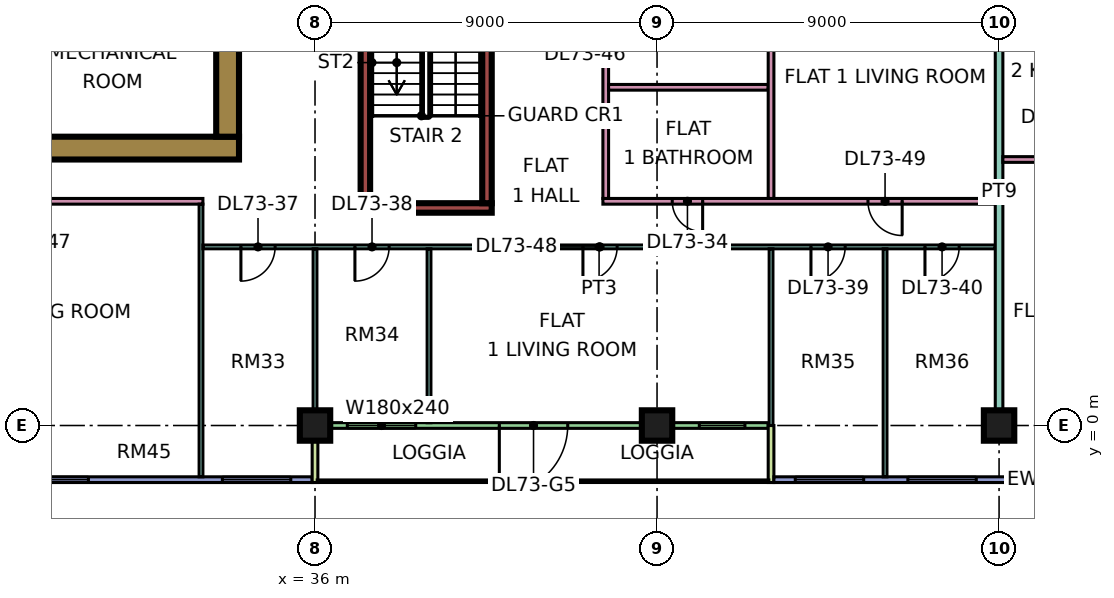
"""IFC4 building model, lengths in metres.
Left out: names, types, materials, properties, quantities, classifications, styles, units other than length and angle.
Written with IfcOpenShell. Run it as: python <this file> out.ifc"""

import sys

from ifc_helpers import new_model, si_unit, direction, frame, frame_2d, origin, origin_2d, place, context, subcontext, project, spatial, rectangle, extrude, element, fill, save


model = new_model("IFC4")
c1 = context("Model", 3, precision=1e-05, world=origin(), true_north=direction((0.0, 1.0)))
c2 = subcontext(c1, "Body", "Model", "MODEL_VIEW")
j1 = project(units=[si_unit("LENGTHUNIT", "METRE"), si_unit("PLANEANGLEUNIT", "RADIAN")], contexts=[c1])
p1 = place(None, origin())
s1 = spatial("IfcSite", under=j1, at=p1, CompositionType="ELEMENT")
p2 = place(p1, origin())
s2 = spatial("IfcBuilding", under=s1, at=p2, CompositionType="ELEMENT")
p3 = place(p2, frame((0.0, 0.0, 310.9)))
s3 = spatial("IfcBuildingStorey", under=s2, at=p3, CompositionType="ELEMENT", Elevation=310.9)
for number, where, z_axis, x_axis in (
    (1, (36.0, 0.0, 0.0), (0.0, 0.0, 1.0), (1.0, 0.0, 0.0)),
    (2, (45.0, 0.0, 0.0), (0.0, 0.0, 1.0), (1.0, 0.0, 0.0)),
    (3, (54.0, 0.0, 0.0), (0.0, 0.0, 1.0), (1.0, 0.0, 0.0)),
):
    element("IfcColumn", number, at=place(p3, frame(where, z_axis=z_axis, x_axis=x_axis)), inside=s3, PredefinedType="COLUMN", context=c2, shape_type="SweptSolid", body=[
        extrude(rectangle(XDim=0.8, YDim=0.8, at=origin_2d()), origin(), (0.0, 0.0, 1.0), 3.75),
    ])
p4 = place(p3, frame((9.0, 7.3, 0.0), z_axis=(0.0, 0.0, 1.0), x_axis=(1.0, 0.0, 0.0)))
e4 = element("IfcWall", 4, at=p4, inside=s3, PredefinedType="SHEAR", context=c2, shape_type="SweptSolid", body=[
    extrude(rectangle(XDim=25.0, YDim=0.6, at=frame_2d((12.5, 0.0))), origin(), (0.0, 0.0, 1.0), 3.75),
])
p5 = place(p3, frame((33.7, 7.6, 0.0), z_axis=(0.0, 0.0, 1.0), x_axis=(0.0, 1.0, 0.0)))
e5 = element("IfcWall", 5, at=p5, inside=s3, PredefinedType="SHEAR", context=c2, shape_type="SweptSolid", body=[
    extrude(rectangle(XDim=11.8, YDim=0.6, at=frame_2d((5.9, 0.0))), origin(), (0.0, 0.0, 1.0), 3.75),
])
p6 = place(p5, frame((5.6, 0.0, 0.0)))
e6 = element("IfcOpeningElement", 6, at=p6, cuts=e5, PredefinedType="OPENING", context=c2, shape_type="SweptSolid", body=[
    extrude(rectangle(XDim=1.8, YDim=2.4, at=frame_2d((0.9, 1.2))), frame((0.0, 0.31, 0.0), z_axis=(0.0, -1.0, 0.0), x_axis=(1.0, 0.0, 0.0)), (0.0, 0.0, 1.0), 0.62),
])
p7 = place(p3, frame((37.2, 5.725, 0.0), z_axis=(0.0, 0.0, 1.0), x_axis=(1.0, 0.0, 0.0)))
e7 = element("IfcWall", 7, at=p7, inside=s3, PredefinedType="SHEAR", context=c2, shape_type="SweptSolid", body=[
    extrude(rectangle(XDim=3.45, YDim=0.25, at=frame_2d((1.725, 0.0))), origin(), (0.0, 0.0, 1.0), 3.75),
])
for number, where, z_axis, x_axis in (
    (8, (37.325, 5.85, 0.0), (0.0, 0.0, 1.0), (0.0, 1.0, 0.0)),
    (9, (40.525, 5.85, 0.0), (0.0, 0.0, 1.0), (0.0, 1.0, 0.0)),
):
    element("IfcWall", number, at=place(p3, frame(where, z_axis=z_axis, x_axis=x_axis)), inside=s3, PredefinedType="SHEAR", context=c2, shape_type="SweptSolid", body=[
        extrude(rectangle(XDim=6.5, YDim=0.25, at=frame_2d((3.25, 0.0))), origin(), (0.0, 0.0, 1.0), 3.75),
    ])
p8 = place(p3, frame((24.075, -1.425, 0.0), z_axis=(0.0, 0.0, 1.0), x_axis=(1.0, 0.0, 0.0)))
e10 = element("IfcWall", 10, at=p8, inside=s3, PredefinedType="SOLIDWALL", context=c2, shape_type="SweptSolid", body=[
    extrude(rectangle(XDim=11.85, YDim=0.15, at=frame_2d((5.925, 0.0))), origin(), (0.0, 0.0, 1.0), 3.35),
])
p9 = place(p8, frame((2.962, 0.0, 0.45)))
e11 = element("IfcOpeningElement", 11, at=p9, cuts=e10, PredefinedType="OPENING", context=c2, shape_type="SweptSolid", body=[
    extrude(rectangle(XDim=3.0, YDim=2.4, at=frame_2d((1.5, 1.2))), frame((0.0, 0.085, 0.0), z_axis=(0.0, -1.0, 0.0), x_axis=(1.0, 0.0, 0.0)), (0.0, 0.0, 1.0), 0.17),
])
p10 = place(p8, frame((9.488, 0.0, 0.45)))
e12 = element("IfcOpeningElement", 12, at=p10, cuts=e10, PredefinedType="OPENING", context=c2, shape_type="SweptSolid", body=[
    extrude(rectangle(XDim=1.8, YDim=2.4, at=frame_2d((0.9, 1.2))), frame((0.0, 0.085, 0.0), z_axis=(0.0, -1.0, 0.0), x_axis=(1.0, 0.0, 0.0)), (0.0, 0.0, 1.0), 0.17),
])
p11 = place(p3, frame((36.075, 0.0, 0.0), z_axis=(0.0, 0.0, 1.0), x_axis=(1.0, 0.0, 0.0)))
e13 = element("IfcWall", 13, at=p11, inside=s3, PredefinedType="SOLIDWALL", context=c2, shape_type="SweptSolid", body=[
    extrude(rectangle(XDim=11.85, YDim=0.15, at=frame_2d((5.925, 0.0))), origin(), (0.0, 0.0, 1.0), 3.35),
])
p12 = place(p11, frame((0.775, 0.0, 0.45)))
e14 = element("IfcOpeningElement", 14, at=p12, cuts=e13, PredefinedType="OPENING", context=c2, shape_type="SweptSolid", body=[
    extrude(rectangle(XDim=1.8, YDim=2.4, at=frame_2d((0.9, 1.2))), frame((0.0, 0.085, 0.0), z_axis=(0.0, -1.0, 0.0), x_axis=(1.0, 0.0, 0.0)), (0.0, 0.0, 1.0), 0.17),
])
p13 = place(p11, frame((4.775, 0.0, 0.0)))
e15 = element("IfcOpeningElement", 15, at=p13, cuts=e13, PredefinedType="OPENING", context=c2, shape_type="SweptSolid", body=[
    extrude(rectangle(XDim=1.8, YDim=2.4, at=frame_2d((0.9, 1.2))), frame((0.0, 0.085, 0.0), z_axis=(0.0, -1.0, 0.0), x_axis=(1.0, 0.0, 0.0)), (0.0, 0.0, 1.0), 0.17),
])
p14 = place(p11, frame((10.038, 0.0, 0.45)))
e16 = element("IfcOpeningElement", 16, at=p14, cuts=e13, PredefinedType="OPENING", context=c2, shape_type="SweptSolid", body=[
    extrude(rectangle(XDim=1.2, YDim=2.4, at=frame_2d((0.6, 1.2))), frame((0.0, 0.085, 0.0), z_axis=(0.0, -1.0, 0.0), x_axis=(1.0, 0.0, 0.0)), (0.0, 0.0, 1.0), 0.17),
])
for number, where, z_axis, x_axis in (
    (17, (36.0, -1.5, 0.0), (0.0, 0.0, 1.0), (0.0, 1.0, 0.0)),
    (18, (48.0, -1.5, 0.0), (0.0, 0.0, 1.0), (0.0, 1.0, 0.0)),
):
    element("IfcWall", number, at=place(p3, frame(where, z_axis=z_axis, x_axis=x_axis)), inside=s3, PredefinedType="SOLIDWALL", context=c2, shape_type="SweptSolid", body=[
        extrude(rectangle(XDim=1.5, YDim=0.15, at=frame_2d((0.75, 0.0))), origin(), (0.0, 0.0, 1.0), 3.35),
    ])
p15 = place(p3, frame((48.075, -1.425, 0.0), z_axis=(0.0, 0.0, 1.0), x_axis=(1.0, 0.0, 0.0)))
e19 = element("IfcWall", 19, at=p15, inside=s3, PredefinedType="SOLIDWALL", context=c2, shape_type="SweptSolid", body=[
    extrude(rectangle(XDim=13.425, YDim=0.15, at=frame_2d((6.712, 0.0))), origin(), (0.0, 0.0, 1.0), 3.35),
])
p16 = place(p15, frame((0.562, 0.0, 0.45)))
e20 = element("IfcOpeningElement", 20, at=p16, cuts=e19, PredefinedType="OPENING", context=c2, shape_type="SweptSolid", body=[
    extrude(rectangle(XDim=1.8, YDim=2.4, at=frame_2d((0.9, 1.2))), frame((0.0, 0.085, 0.0), z_axis=(0.0, -1.0, 0.0), x_axis=(1.0, 0.0, 0.0)), (0.0, 0.0, 1.0), 0.17),
])
p17 = place(p15, frame((3.525, 0.0, 0.45)))
e21 = element("IfcOpeningElement", 21, at=p17, cuts=e19, PredefinedType="OPENING", context=c2, shape_type="SweptSolid", body=[
    extrude(rectangle(XDim=1.8, YDim=2.4, at=frame_2d((0.9, 1.2))), frame((0.0, 0.085, 0.0), z_axis=(0.0, -1.0, 0.0), x_axis=(1.0, 0.0, 0.0)), (0.0, 0.0, 1.0), 0.17),
])
p18 = place(p15, frame((7.425, 0.0, 0.45)))
e22 = element("IfcOpeningElement", 22, at=p18, cuts=e19, PredefinedType="OPENING", context=c2, shape_type="SweptSolid", body=[
    extrude(rectangle(XDim=3.0, YDim=2.4, at=frame_2d((1.5, 1.2))), frame((0.0, 0.085, 0.0), z_axis=(0.0, -1.0, 0.0), x_axis=(1.0, 0.0, 0.0)), (0.0, 0.0, 1.0), 0.17),
])
p19 = place(p15, frame((12.225, 0.0, 0.45)))
e23 = element("IfcOpeningElement", 23, at=p19, cuts=e19, PredefinedType="OPENING", context=c2, shape_type="SweptSolid", body=[
    extrude(rectangle(XDim=0.9, YDim=2.4, at=frame_2d((0.45, 1.2))), frame((0.0, 0.085, 0.0), z_axis=(0.0, -1.0, 0.0), x_axis=(1.0, 0.0, 0.0)), (0.0, 0.0, 1.0), 0.17),
])
p20 = place(p3, frame((11.95, 5.9, 0.0), z_axis=(0.0, 0.0, 1.0), x_axis=(1.0, 0.0, 0.0)))
e24 = element("IfcWall", 24, at=p20, inside=s3, PredefinedType="PARTITIONING", context=c2, shape_type="SweptSolid", body=[
    extrude(rectangle(XDim=21.1, YDim=0.15, at=frame_2d((10.55, 0.0))), origin(), (0.0, 0.0, 1.0), 3.35),
])
p21 = place(p20, frame((1.1, 0.0, 0.0)))
e25 = element("IfcOpeningElement", 25, at=p21, cuts=e24, PredefinedType="OPENING", context=c2, shape_type="SweptSolid", body=[
    extrude(rectangle(XDim=0.9, YDim=2.1, at=frame_2d((0.45, 1.05))), frame((0.0, 0.085, 0.0), z_axis=(0.0, -1.0, 0.0), x_axis=(1.0, 0.0, 0.0)), (0.0, 0.0, 1.0), 0.17),
])
p22 = place(p20, frame((4.1, 0.0, 0.0)))
e26 = element("IfcOpeningElement", 26, at=p22, cuts=e24, PredefinedType="OPENING", context=c2, shape_type="SweptSolid", body=[
    extrude(rectangle(XDim=0.9, YDim=2.1, at=frame_2d((0.45, 1.05))), frame((0.0, 0.085, 0.0), z_axis=(0.0, -1.0, 0.0), x_axis=(1.0, 0.0, 0.0)), (0.0, 0.0, 1.0), 0.17),
])
p23 = place(p20, frame((10.1, 0.0, 0.0)))
e27 = element("IfcOpeningElement", 27, at=p23, cuts=e24, PredefinedType="OPENING", context=c2, shape_type="SweptSolid", body=[
    extrude(rectangle(XDim=0.9, YDim=2.1, at=frame_2d((0.45, 1.05))), frame((0.0, 0.085, 0.0), z_axis=(0.0, -1.0, 0.0), x_axis=(1.0, 0.0, 0.0)), (0.0, 0.0, 1.0), 0.17),
])
p24 = place(p20, frame((16.1, 0.0, 0.0)))
e28 = element("IfcOpeningElement", 28, at=p24, cuts=e24, PredefinedType="OPENING", context=c2, shape_type="SweptSolid", body=[
    extrude(rectangle(XDim=0.9, YDim=2.1, at=frame_2d((0.45, 1.05))), frame((0.0, 0.085, 0.0), z_axis=(0.0, -1.0, 0.0), x_axis=(1.0, 0.0, 0.0)), (0.0, 0.0, 1.0), 0.17),
])
p25 = place(p3, frame((33.0, -1.35, 0.0), z_axis=(0.0, 0.0, 1.0), x_axis=(0.0, 1.0, 0.0)))
e29 = element("IfcWall", 29, at=p25, inside=s3, PredefinedType="PARTITIONING", context=c2, shape_type="SweptSolid", body=[
    extrude(rectangle(XDim=7.175, YDim=0.1, at=frame_2d((3.587, 0.0))), origin(), (0.0, 0.0, 1.0), 3.35),
])
p26 = place(p3, frame((33.05, 4.7, 0.0), z_axis=(0.0, 0.0, 1.0), x_axis=(1.0, 0.0, 0.0)))
e30 = element("IfcWall", 30, at=p26, inside=s3, PredefinedType="PARTITIONING", context=c2, shape_type="SweptSolid", body=[
    extrude(rectangle(XDim=20.85, YDim=0.1, at=frame_2d((10.425, 0.0))), origin(), (0.0, 0.0, 1.0), 3.35),
])
p27 = place(p26, frame((1.0, 0.0, 0.0)))
e31 = element("IfcOpeningElement", 31, at=p27, cuts=e30, PredefinedType="OPENING", context=c2, shape_type="SweptSolid", body=[
    extrude(rectangle(XDim=0.9, YDim=2.1, at=frame_2d((0.45, 1.05))), frame((0.0, 0.06, 0.0), z_axis=(0.0, -1.0, 0.0), x_axis=(1.0, 0.0, 0.0)), (0.0, 0.0, 1.0), 0.12),
])
p28 = place(p26, frame((4.0, 0.0, 0.0)))
e32 = element("IfcOpeningElement", 32, at=p28, cuts=e30, PredefinedType="OPENING", context=c2, shape_type="SweptSolid", body=[
    extrude(rectangle(XDim=0.9, YDim=2.1, at=frame_2d((0.45, 1.05))), frame((0.0, 0.06, 0.0), z_axis=(0.0, -1.0, 0.0), x_axis=(1.0, 0.0, 0.0)), (0.0, 0.0, 1.0), 0.12),
])
p29 = place(p26, frame((16.0, 0.0, 0.0)))
e33 = element("IfcOpeningElement", 33, at=p29, cuts=e30, PredefinedType="OPENING", context=c2, shape_type="SweptSolid", body=[
    extrude(rectangle(XDim=0.9, YDim=2.1, at=frame_2d((0.45, 1.05))), frame((0.0, 0.06, 0.0), z_axis=(0.0, -1.0, 0.0), x_axis=(1.0, 0.0, 0.0)), (0.0, 0.0, 1.0), 0.12),
])
p30 = place(p26, frame((19.0, 0.0, 0.0)))
e34 = element("IfcOpeningElement", 34, at=p30, cuts=e30, PredefinedType="OPENING", context=c2, shape_type="SweptSolid", body=[
    extrude(rectangle(XDim=0.9, YDim=2.1, at=frame_2d((0.45, 1.05))), frame((0.0, 0.06, 0.0), z_axis=(0.0, -1.0, 0.0), x_axis=(1.0, 0.0, 0.0)), (0.0, 0.0, 1.0), 0.12),
])
p31 = place(p26, frame((10.0, 0.0, 0.0)))
e35 = element("IfcOpeningElement", 35, at=p31, cuts=e30, PredefinedType="OPENING", context=c2, shape_type="SweptSolid", body=[
    extrude(rectangle(XDim=0.9, YDim=2.1, at=frame_2d((0.45, 1.05))), frame((0.0, 0.06, 0.0), z_axis=(0.0, -1.0, 0.0), x_axis=(1.0, 0.0, 0.0)), (0.0, 0.0, 1.0), 0.12),
])
p32 = place(p3, frame((36.0, 0.0, 0.0), z_axis=(0.0, 0.0, 1.0), x_axis=(0.0, 1.0, 0.0)))
e36 = element("IfcWall", 36, at=p32, inside=s3, PredefinedType="PARTITIONING", context=c2, shape_type="SweptSolid", body=[
    extrude(rectangle(XDim=4.65, YDim=0.1, at=frame_2d((2.325, 0.0))), origin(), (0.0, 0.0, 1.0), 3.35),
])
p33 = place(p3, frame((39.0, 0.074, 0.0), z_axis=(0.0, 0.0, 1.0), x_axis=(0.0, 1.0, 0.0)))
e37 = element("IfcWall", 37, at=p33, inside=s3, PredefinedType="PARTITIONING", context=c2, shape_type="SweptSolid", body=[
    extrude(rectangle(XDim=4.576, YDim=0.1, at=frame_2d((2.288, 0.0))), origin(), (0.0, 0.0, 1.0), 3.35),
])
p34 = place(p3, frame((43.575, 5.9, 0.0), z_axis=(0.0, 0.0, 1.0), x_axis=(1.0, 0.0, 0.0)))
e38 = element("IfcWall", 38, at=p34, inside=s3, PredefinedType="PARTITIONING", context=c2, shape_type="SweptSolid", body=[
    extrude(rectangle(XDim=10.325, YDim=0.15, at=frame_2d((5.163, 0.0))), origin(), (0.0, 0.0, 1.0), 3.35),
])
p35 = place(p34, frame((1.825, 0.0, 0.0)))
e39 = element("IfcOpeningElement", 39, at=p35, cuts=e38, PredefinedType="OPENING", context=c2, shape_type="SweptSolid", body=[
    extrude(rectangle(XDim=0.8, YDim=2.1, at=frame_2d((0.4, 1.05))), frame((0.0, 0.085, 0.0), z_axis=(0.0, -1.0, 0.0), x_axis=(1.0, 0.0, 0.0)), (0.0, 0.0, 1.0), 0.17),
])
p36 = place(p34, frame((6.975, 0.0, 0.0)))
e40 = element("IfcOpeningElement", 40, at=p36, cuts=e38, PredefinedType="OPENING", context=c2, shape_type="SweptSolid", body=[
    extrude(rectangle(XDim=0.9, YDim=2.1, at=frame_2d((0.45, 1.05))), frame((0.0, 0.085, 0.0), z_axis=(0.0, -1.0, 0.0), x_axis=(1.0, 0.0, 0.0)), (0.0, 0.0, 1.0), 0.17),
])
p37 = place(p3, frame((43.65, 5.975, 0.0), z_axis=(0.0, 0.0, 1.0), x_axis=(0.0, 1.0, 0.0)))
e41 = element("IfcWall", 41, at=p37, inside=s3, PredefinedType="PARTITIONING", context=c2, shape_type="SweptSolid", body=[
    extrude(rectangle(XDim=6.325, YDim=0.15, at=frame_2d((3.163, 0.0))), origin(), (0.0, 0.0, 1.0), 3.35),
])
p38 = place(p37, frame((4.275, 0.0, 0.0)))
e42 = element("IfcOpeningElement", 42, at=p38, cuts=e41, PredefinedType="OPENING", context=c2, shape_type="SweptSolid", body=[
    extrude(rectangle(XDim=0.9, YDim=2.1, at=frame_2d((0.45, 1.05))), frame((0.0, 0.085, 0.0), z_axis=(0.0, -1.0, 0.0), x_axis=(1.0, 0.0, 0.0)), (0.0, 0.0, 1.0), 0.17),
])
p39 = place(p3, frame((43.725, 8.9, 0.0), z_axis=(0.0, 0.0, 1.0), x_axis=(1.0, 0.0, 0.0)))
e43 = element("IfcWall", 43, at=p39, inside=s3, PredefinedType="PARTITIONING", context=c2, shape_type="SweptSolid", body=[
    extrude(rectangle(XDim=4.2, YDim=0.15, at=frame_2d((2.1, 0.0))), origin(), (0.0, 0.0, 1.0), 3.35),
])
p40 = place(p3, frame((48.0, 0.0, 0.0), z_axis=(0.0, 0.0, 1.0), x_axis=(0.0, 1.0, 0.0)))
e44 = element("IfcWall", 44, at=p40, inside=s3, PredefinedType="PARTITIONING", context=c2, shape_type="SweptSolid", body=[
    extrude(rectangle(XDim=4.65, YDim=0.1, at=frame_2d((2.325, 0.0))), origin(), (0.0, 0.0, 1.0), 3.35),
])
p41 = place(p3, frame((48.0, 5.975, 0.0), z_axis=(0.0, 0.0, 1.0), x_axis=(0.0, 1.0, 0.0)))
e45 = element("IfcWall", 45, at=p41, inside=s3, PredefinedType="PARTITIONING", context=c2, shape_type="SweptSolid", body=[
    extrude(rectangle(XDim=6.325, YDim=0.15, at=frame_2d((3.163, 0.0))), origin(), (0.0, 0.0, 1.0), 3.35),
])
p42 = place(p3, frame((51.0, -1.351, 0.0), z_axis=(0.0, 0.0, 1.0), x_axis=(0.0, 1.0, 0.0)))
e46 = element("IfcWall", 46, at=p42, inside=s3, PredefinedType="PARTITIONING", context=c2, shape_type="SweptSolid", body=[
    extrude(rectangle(XDim=6.001, YDim=0.1, at=frame_2d((3.0, 0.0))), origin(), (0.0, 0.0, 1.0), 3.35),
])
p43 = place(p3, frame((54.0, 0.0, 0.0), z_axis=(0.0, 0.0, 1.0), x_axis=(0.0, 1.0, 0.0)))
e47 = element("IfcWall", 47, at=p43, inside=s3, PredefinedType="PARTITIONING", context=c2, shape_type="SweptSolid", body=[
    extrude(rectangle(XDim=12.3, YDim=0.2, at=frame_2d((6.15, 0.0))), origin(), (0.0, 0.0, 1.0), 3.35),
])
p44 = place(p3, frame((54.1, 7.0, 0.0), z_axis=(0.0, 0.0, 1.0), x_axis=(1.0, 0.0, 0.0)))
e48 = element("IfcWall", 48, at=p44, inside=s3, PredefinedType="PARTITIONING", context=c2, shape_type="SweptSolid", body=[
    extrude(rectangle(XDim=5.975, YDim=0.15, at=frame_2d((2.987, 0.0))), origin(), (0.0, 0.0, 1.0), 3.35),
])
p45 = place(p44, frame((1.1, 0.0, 0.0)))
e49 = element("IfcOpeningElement", 49, at=p45, cuts=e48, PredefinedType="OPENING", context=c2, shape_type="SweptSolid", body=[
    extrude(rectangle(XDim=0.9, YDim=2.1, at=frame_2d((0.45, 1.05))), frame((0.0, 0.085, 0.0), z_axis=(0.0, -1.0, 0.0), x_axis=(1.0, 0.0, 0.0)), (0.0, 0.0, 1.0), 0.17),
])
p46 = place(p9, origin())
e50 = element("IfcWindow", 50, at=p46, inside=s3, PartitioningType="SINGLE_PANEL", PredefinedType="WINDOW", context=c2, shape_type="SweptSolid", body=[
    extrude(rectangle(XDim=3.0, YDim=2.4, at=frame_2d((1.5, 1.2))), frame((0.0, 0.03, 0.0), z_axis=(0.0, -1.0, 0.0), x_axis=(1.0, 0.0, 0.0)), (0.0, 0.0, 1.0), 0.06),
])
fill(e11, e50)
p47 = place(p10, origin())
e51 = element("IfcWindow", 51, at=p47, inside=s3, PartitioningType="SINGLE_PANEL", PredefinedType="WINDOW", context=c2, shape_type="SweptSolid", body=[
    extrude(rectangle(XDim=1.8, YDim=2.4, at=frame_2d((0.9, 1.2))), frame((0.0, 0.03, 0.0), z_axis=(0.0, -1.0, 0.0), x_axis=(1.0, 0.0, 0.0)), (0.0, 0.0, 1.0), 0.06),
])
fill(e12, e51)
p48 = place(p12, origin())
e52 = element("IfcWindow", 52, at=p48, inside=s3, PartitioningType="SINGLE_PANEL", PredefinedType="WINDOW", context=c2, shape_type="SweptSolid", body=[
    extrude(rectangle(XDim=1.8, YDim=2.4, at=frame_2d((0.9, 1.2))), frame((0.0, 0.03, 0.0), z_axis=(0.0, -1.0, 0.0), x_axis=(1.0, 0.0, 0.0)), (0.0, 0.0, 1.0), 0.06),
])
fill(e14, e52)
p49 = place(p13, frame((1.8, 0.0, 0.0), z_axis=(0.0, 0.0, 1.0), x_axis=(-1.0, 0.0, 0.0)))
e53 = element("IfcDoor", 53, at=p49, inside=s3, OperationType="DOUBLE_DOOR_SINGLE_SWING", PredefinedType="DOOR", context=c2, shape_type="SweptSolid", body=[
    extrude(rectangle(XDim=1.8, YDim=2.4, at=frame_2d((0.9, 1.2))), frame((0.0, 0.025, 0.0), z_axis=(0.0, -1.0, 0.0), x_axis=(1.0, 0.0, 0.0)), (0.0, 0.0, 1.0), 0.05),
])
fill(e15, e53)
p50 = place(p14, origin())
e54 = element("IfcWindow", 54, at=p50, inside=s3, PartitioningType="SINGLE_PANEL", PredefinedType="WINDOW", context=c2, shape_type="SweptSolid", body=[
    extrude(rectangle(XDim=1.2, YDim=2.4, at=frame_2d((0.6, 1.2))), frame((0.0, 0.03, 0.0), z_axis=(0.0, -1.0, 0.0), x_axis=(1.0, 0.0, 0.0)), (0.0, 0.0, 1.0), 0.06),
])
fill(e16, e54)
p51 = place(p16, origin())
e55 = element("IfcWindow", 55, at=p51, inside=s3, PartitioningType="SINGLE_PANEL", PredefinedType="WINDOW", context=c2, shape_type="SweptSolid", body=[
    extrude(rectangle(XDim=1.8, YDim=2.4, at=frame_2d((0.9, 1.2))), frame((0.0, 0.03, 0.0), z_axis=(0.0, -1.0, 0.0), x_axis=(1.0, 0.0, 0.0)), (0.0, 0.0, 1.0), 0.06),
])
fill(e20, e55)
p52 = place(p17, origin())
e56 = element("IfcWindow", 56, at=p52, inside=s3, PartitioningType="SINGLE_PANEL", PredefinedType="WINDOW", context=c2, shape_type="SweptSolid", body=[
    extrude(rectangle(XDim=1.8, YDim=2.4, at=frame_2d((0.9, 1.2))), frame((0.0, 0.03, 0.0), z_axis=(0.0, -1.0, 0.0), x_axis=(1.0, 0.0, 0.0)), (0.0, 0.0, 1.0), 0.06),
])
fill(e21, e56)
p53 = place(p35, origin())
e57 = element("IfcDoor", 57, at=p53, inside=s3, OperationType="SINGLE_SWING_RIGHT", PredefinedType="DOOR", context=c2, shape_type="SweptSolid", body=[
    extrude(rectangle(XDim=0.8, YDim=2.1, at=frame_2d((0.4, 1.05))), frame((0.0, 0.025, 0.0), z_axis=(0.0, -1.0, 0.0), x_axis=(1.0, 0.0, 0.0)), (0.0, 0.0, 1.0), 0.05),
])
fill(e39, e57)
p54 = place(p27, frame((0.9, 0.0, 0.0), z_axis=(0.0, 0.0, 1.0), x_axis=(-1.0, 0.0, 0.0)))
e58 = element("IfcDoor", 58, at=p54, inside=s3, OperationType="SINGLE_SWING_LEFT", PredefinedType="DOOR", context=c2, shape_type="SweptSolid", body=[
    extrude(rectangle(XDim=0.9, YDim=2.1, at=frame_2d((0.45, 1.05))), frame((0.0, 0.025, 0.0), z_axis=(0.0, -1.0, 0.0), x_axis=(1.0, 0.0, 0.0)), (0.0, 0.0, 1.0), 0.05),
])
fill(e31, e58)
p55 = place(p28, frame((0.9, 0.0, 0.0), z_axis=(0.0, 0.0, 1.0), x_axis=(-1.0, 0.0, 0.0)))
e59 = element("IfcDoor", 59, at=p55, inside=s3, OperationType="SINGLE_SWING_LEFT", PredefinedType="DOOR", context=c2, shape_type="SweptSolid", body=[
    extrude(rectangle(XDim=0.9, YDim=2.1, at=frame_2d((0.45, 1.05))), frame((0.0, 0.025, 0.0), z_axis=(0.0, -1.0, 0.0), x_axis=(1.0, 0.0, 0.0)), (0.0, 0.0, 1.0), 0.05),
])
fill(e32, e59)
p56 = place(p29, frame((0.9, 0.0, 0.0), z_axis=(0.0, 0.0, 1.0), x_axis=(-1.0, 0.0, 0.0)))
e60 = element("IfcDoor", 60, at=p56, inside=s3, OperationType="SINGLE_SWING_LEFT", PredefinedType="DOOR", context=c2, shape_type="SweptSolid", body=[
    extrude(rectangle(XDim=0.9, YDim=2.1, at=frame_2d((0.45, 1.05))), frame((0.0, 0.025, 0.0), z_axis=(0.0, -1.0, 0.0), x_axis=(1.0, 0.0, 0.0)), (0.0, 0.0, 1.0), 0.05),
])
fill(e33, e60)
p57 = place(p30, frame((0.9, 0.0, 0.0), z_axis=(0.0, 0.0, 1.0), x_axis=(-1.0, 0.0, 0.0)))
e61 = element("IfcDoor", 61, at=p57, inside=s3, OperationType="SINGLE_SWING_LEFT", PredefinedType="DOOR", context=c2, shape_type="SweptSolid", body=[
    extrude(rectangle(XDim=0.9, YDim=2.1, at=frame_2d((0.45, 1.05))), frame((0.0, 0.025, 0.0), z_axis=(0.0, -1.0, 0.0), x_axis=(1.0, 0.0, 0.0)), (0.0, 0.0, 1.0), 0.05),
])
fill(e34, e61)
p58 = place(p31, frame((0.9, 0.0, 0.0), z_axis=(0.0, 0.0, 1.0), x_axis=(-1.0, 0.0, 0.0)))
e62 = element("IfcDoor", 62, at=p58, inside=s3, OperationType="SINGLE_SWING_LEFT", PredefinedType="DOOR", context=c2, shape_type="SweptSolid", body=[
    extrude(rectangle(XDim=0.9, YDim=2.1, at=frame_2d((0.45, 1.05))), frame((0.0, 0.025, 0.0), z_axis=(0.0, -1.0, 0.0), x_axis=(1.0, 0.0, 0.0)), (0.0, 0.0, 1.0), 0.05),
])
fill(e35, e62)
p59 = place(p36, origin())
e63 = element("IfcDoor", 63, at=p59, inside=s3, OperationType="SINGLE_SWING_RIGHT", PredefinedType="DOOR", context=c2, shape_type="SweptSolid", body=[
    extrude(rectangle(XDim=0.9, YDim=2.1, at=frame_2d((0.45, 1.05))), frame((0.0, 0.025, 0.0), z_axis=(0.0, -1.0, 0.0), x_axis=(1.0, 0.0, 0.0)), (0.0, 0.0, 1.0), 0.05),
])
fill(e40, e63)
save(model, sys.argv[1])
